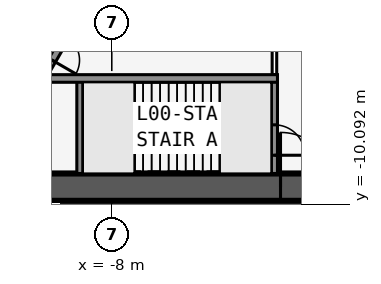
"""IFC4 building model, lengths in metres.
Left out: names, types, materials, properties, quantities, classifications, styles, units other than length and angle.
Written with IfcOpenShell. Run it as: python <this file> out.ifc"""

import sys

from ifc_helpers import new_model, si_unit, direction, frame, frame_2d, origin, place, context, subcontext, project, spatial, rectangle, extrude, element, fill, save


model = new_model("IFC4")
c1 = context("Model", 3, precision=1e-05, world=origin(), true_north=direction((0.0, 1.0)))
c2 = subcontext(c1, "Body", "Model", "MODEL_VIEW")
j1 = project(units=[si_unit("LENGTHUNIT", "METRE"), si_unit("PLANEANGLEUNIT", "RADIAN")], contexts=[c1])
p1 = place(None, origin())
s1 = spatial("IfcSite", under=j1, at=p1, CompositionType="ELEMENT")
p2 = place(p1, origin())
s2 = spatial("IfcBuilding", under=s1, at=p2, CompositionType="ELEMENT")
p3 = place(p2, origin())
s3 = spatial("IfcBuildingStorey", under=s2, at=p3, CompositionType="ELEMENT", Elevation=0.0)
p4 = place(p3, frame((-16.5, -9.526, -0.3), z_axis=(0.0, 0.0, 1.0), x_axis=(1.0, 0.0, 0.0)))
e1 = element("IfcWall", 1, at=p4, inside=s3, PredefinedType="SHEAR", context=c2, shape_type="SweptSolid", body=[
    extrude(rectangle(XDim=33.0, YDim=0.9, at=frame_2d((16.5, 0.0))), origin(), (0.0, 0.0, 1.0), 6.3),
])
p5 = place(p4, frame((14.05, 0.0, 0.3)))
e2 = element("IfcOpeningElement", 2, at=p5, cuts=e1, PredefinedType="OPENING", context=c2, shape_type="SweptSolid", body=[
    extrude(rectangle(XDim=1.8, YDim=2.13, at=frame_2d((0.9, 1.065))), frame((0.0, 0.46, 0.0), z_axis=(0.0, -1.0, 0.0), x_axis=(1.0, 0.0, 0.0)), (0.0, 0.0, 1.0), 0.92),
])
p6 = place(p3, frame((-10.183, -5.951, -0.3), z_axis=(0.0, 0.0, 1.0), x_axis=(1.0, 0.0, 0.0)))
e3 = element("IfcWall", 3, at=p6, inside=s3, PredefinedType="SOLIDWALL", context=c2, shape_type="SweptSolid", body=[
    extrude(rectangle(XDim=7.633, YDim=0.25, at=frame_2d((3.816, 0.0))), origin(), (0.0, 0.0, 1.0), 6.05),
])
p7 = place(p3, frame((-9.05, -5.951, -0.3), z_axis=(0.0, 0.0, 1.0), x_axis=(0.0, -1.0, 0.0)))
e4 = element("IfcWall", 4, at=p7, inside=s3, PredefinedType="SOLIDWALL", context=c2, shape_type="SweptSolid", body=[
    extrude(rectangle(XDim=3.125, YDim=0.2, at=frame_2d((1.562, 0.0))), origin(), (0.0, 0.0, 1.0), 6.05),
])
p8 = place(p3, frame((-2.65, -5.951, -0.3), z_axis=(0.0, 0.0, 1.0), x_axis=(0.0, -1.0, 0.0)))
e5 = element("IfcWall", 5, at=p8, inside=s3, PredefinedType="SOLIDWALL", context=c2, shape_type="SweptSolid", body=[
    extrude(rectangle(XDim=3.125, YDim=0.2, at=frame_2d((1.562, 0.0))), origin(), (0.0, 0.0, 1.0), 6.05),
])
p9 = place(p8, frame((1.525, 0.0, 0.3)))
e6 = element("IfcOpeningElement", 6, at=p9, cuts=e5, PredefinedType="OPENING", context=c2, shape_type="SweptSolid", body=[
    extrude(rectangle(XDim=1.0, YDim=2.13, at=frame_2d((0.5, 1.065))), frame((0.0, 0.11, 0.0), z_axis=(0.0, -1.0, 0.0), x_axis=(1.0, 0.0, 0.0)), (0.0, 0.0, 1.0), 0.22),
])
p10 = place(p3, frame((0.0, 19.052, -0.3), z_axis=(0.0, 0.0, 1.0), x_axis=(-0.499999749417, -0.866025548458, 0.0)))
e7 = element("IfcWall", 7, at=p10, inside=s3, PredefinedType="SHEAR", context=c2, shape_type="SweptSolid", body=[
    extrude(rectangle(XDim=33.0, YDim=0.9, at=frame_2d((16.5, 0.0))), origin(), (0.0, 0.0, 1.0), 6.3),
])
p11 = place(p10, frame((14.15, 0.0, 0.3)))
e8 = element("IfcOpeningElement", 8, at=p11, cuts=e7, PredefinedType="OPENING", context=c2, shape_type="SweptSolid", body=[
    extrude(rectangle(XDim=1.8, YDim=2.13, at=frame_2d((0.9, 1.065))), frame((0.0, 0.46, 0.0), z_axis=(0.0, -1.0, 0.0), x_axis=(1.0, 0.0, 0.0)), (0.0, 0.0, 1.0), 0.92),
])
p12 = place(p10, frame((12.6, 0.0, 0.3)))
e9 = element("IfcOpeningElement", 9, at=p12, cuts=e7, PredefinedType="OPENING", context=c2, shape_type="SweptSolid", body=[
    extrude(rectangle(XDim=1.0, YDim=2.13, at=frame_2d((0.5, 1.065))), frame((0.0, 0.46, 0.0), z_axis=(0.0, -1.0, 0.0), x_axis=(1.0, 0.0, 0.0)), (0.0, 0.0, 1.0), 0.92),
])
p13 = place(p3, frame((-4.929, 3.365, -0.3), z_axis=(0.0, 0.0, 1.0), x_axis=(-0.499991433582, -0.866030349552, 0.0)))
e10 = element("IfcWall", 10, at=p13, inside=s3, PredefinedType="SOLIDWALL", context=c2, shape_type="SweptSolid", body=[
    extrude(rectangle(XDim=10.633, YDim=0.25, at=frame_2d((5.316, 0.0))), origin(), (0.0, 0.0, 1.0), 6.05),
])
p14 = place(p13, frame((9.164, 0.0, 0.3)))
e11 = element("IfcOpeningElement", 11, at=p14, cuts=e10, PredefinedType="OPENING", context=c2, shape_type="SweptSolid", body=[
    extrude(rectangle(XDim=0.9, YDim=2.13, at=frame_2d((0.45, 1.065))), frame((0.0, 0.135, 0.0), z_axis=(0.0, -1.0, 0.0), x_axis=(1.0, 0.0, 0.0)), (0.0, 0.0, 1.0), 0.27),
])
p15 = place(p13, frame((6.8, 0.0, 0.3)))
e12 = element("IfcOpeningElement", 12, at=p15, cuts=e10, PredefinedType="OPENING", context=c2, shape_type="SweptSolid", body=[
    extrude(rectangle(XDim=1.1, YDim=2.13, at=frame_2d((0.55, 1.065))), frame((0.0, 0.135, 0.0), z_axis=(0.0, -1.0, 0.0), x_axis=(1.0, 0.0, 0.0)), (0.0, 0.0, 1.0), 0.27),
])
p16 = place(p13, frame((1.0, 0.0, 0.3)))
e13 = element("IfcOpeningElement", 13, at=p16, cuts=e10, PredefinedType="OPENING", context=c2, shape_type="SweptSolid", body=[
    extrude(rectangle(XDim=1.1, YDim=2.13, at=frame_2d((0.55, 1.065))), frame((0.0, 0.135, 0.0), z_axis=(0.0, -1.0, 0.0), x_axis=(1.0, 0.0, 0.0)), (0.0, 0.0, 1.0), 0.27),
])
p17 = place(p13, frame((3.9, 0.0, 0.3)))
e14 = element("IfcOpeningElement", 14, at=p17, cuts=e10, PredefinedType="OPENING", context=c2, shape_type="SweptSolid", body=[
    extrude(rectangle(XDim=1.1, YDim=2.13, at=frame_2d((0.55, 1.065))), frame((0.0, 0.135, 0.0), z_axis=(0.0, -1.0, 0.0), x_axis=(1.0, 0.0, 0.0)), (0.0, 0.0, 1.0), 0.27),
])
p18 = place(p3, frame((-0.5, 22.836, -0.3), z_axis=(0.0, 0.0, 1.0), x_axis=(-0.500001677587, -0.866024435227, 0.0)))
e15 = element("IfcWall", 15, at=p18, inside=s3, PredefinedType="PARTITIONING", context=c2, shape_type="SweptSolid", body=[
    extrude(rectangle(XDim=39.054, YDim=0.15, at=frame_2d((19.527, 0.0))), origin(), (0.0, 0.0, 1.0), 5.108),
])
p19 = place(p18, frame((2.013, 0.0, 0.3)))
e16 = element("IfcOpeningElement", 16, at=p19, cuts=e15, PredefinedType="OPENING", context=c2, shape_type="SweptSolid", body=[
    extrude(rectangle(XDim=1.8, YDim=2.13, at=frame_2d((0.9, 1.065))), frame((0.0, 0.085, 0.0), z_axis=(0.0, -1.0, 0.0), x_axis=(1.0, 0.0, 0.0)), (0.0, 0.0, 1.0), 0.17),
])
p20 = place(p18, frame((10.427, 0.0, 0.3)))
e17 = element("IfcOpeningElement", 17, at=p20, cuts=e15, PredefinedType="OPENING", context=c2, shape_type="SweptSolid", body=[
    extrude(rectangle(XDim=1.8, YDim=2.13, at=frame_2d((0.9, 1.065))), frame((0.0, 0.085, 0.0), z_axis=(0.0, -1.0, 0.0), x_axis=(1.0, 0.0, 0.0)), (0.0, 0.0, 1.0), 0.17),
])
p21 = place(p18, frame((18.427, 0.0, 0.3)))
e18 = element("IfcOpeningElement", 18, at=p21, cuts=e15, PredefinedType="OPENING", context=c2, shape_type="SweptSolid", body=[
    extrude(rectangle(XDim=1.8, YDim=2.13, at=frame_2d((0.9, 1.065))), frame((0.0, 0.085, 0.0), z_axis=(0.0, -1.0, 0.0), x_axis=(1.0, 0.0, 0.0)), (0.0, 0.0, 1.0), 0.17),
])
p22 = place(p18, frame((23.227, 0.0, 0.3)))
e19 = element("IfcOpeningElement", 19, at=p22, cuts=e15, PredefinedType="OPENING", context=c2, shape_type="SweptSolid", body=[
    extrude(rectangle(XDim=1.8, YDim=2.13, at=frame_2d((0.9, 1.065))), frame((0.0, 0.085, 0.0), z_axis=(0.0, -1.0, 0.0), x_axis=(1.0, 0.0, 0.0)), (0.0, 0.0, 1.0), 0.17),
])
p23 = place(p18, frame((27.627, 0.0, 0.3)))
e20 = element("IfcOpeningElement", 20, at=p23, cuts=e15, PredefinedType="OPENING", context=c2, shape_type="SweptSolid", body=[
    extrude(rectangle(XDim=1.0, YDim=2.13, at=frame_2d((0.5, 1.065))), frame((0.0, 0.085, 0.0), z_axis=(0.0, -1.0, 0.0), x_axis=(1.0, 0.0, 0.0)), (0.0, 0.0, 1.0), 0.17),
])
p24 = place(p18, frame((30.277, 0.0, 0.3)))
e21 = element("IfcOpeningElement", 21, at=p24, cuts=e15, PredefinedType="OPENING", context=c2, shape_type="SweptSolid", body=[
    extrude(rectangle(XDim=1.0, YDim=2.13, at=frame_2d((0.5, 1.065))), frame((0.0, 0.085, 0.0), z_axis=(0.0, -1.0, 0.0), x_axis=(1.0, 0.0, 0.0)), (0.0, 0.0, 1.0), 0.17),
])
p25 = place(p18, frame((34.89, 0.0, 0.3)))
e22 = element("IfcOpeningElement", 22, at=p25, cuts=e15, PredefinedType="OPENING", context=c2, shape_type="SweptSolid", body=[
    extrude(rectangle(XDim=1.0, YDim=2.13, at=frame_2d((0.5, 1.065))), frame((0.0, 0.085, 0.0), z_axis=(0.0, -1.0, 0.0), x_axis=(1.0, 0.0, 0.0)), (0.0, 0.0, 1.0), 0.17),
])
p26 = place(p3, frame((-2.65, -5.826, -0.3), z_axis=(0.0, 0.0, 1.0), x_axis=(0.0, 1.0, 0.0)))
e23 = element("IfcWall", 23, at=p26, inside=s3, PredefinedType="PARTITIONING", context=c2, shape_type="SweptSolid", body=[
    extrude(rectangle(XDim=2.5, YDim=0.15, at=frame_2d((1.25, 0.0))), origin(), (0.0, 0.0, 1.0), 6.05),
])
p27 = place(p3, frame((-7.247, -7.576, 0.0), z_axis=(0.0, 0.0, 1.0), x_axis=(1.0, 0.0, 0.0)))
e24 = element("IfcWall", 24, at=p27, inside=s3, PredefinedType="SOLIDWALL", context=c2, shape_type="SweptSolid", body=[
    extrude(rectangle(XDim=2.794, YDim=0.1, at=frame_2d((1.397, 0.0))), origin(), (0.0, 0.0, 1.0), 6.0),
])
p28 = place(p5, origin())
e25 = element("IfcDoor", 25, at=p28, inside=s3, OperationType="DOUBLE_DOOR_SINGLE_SWING", PredefinedType="DOOR", context=c2, shape_type="SweptSolid", body=[
    extrude(rectangle(XDim=1.8, YDim=2.13, at=frame_2d((0.9, 1.065))), frame((0.0, 0.025, 0.0), z_axis=(0.0, -1.0, 0.0), x_axis=(1.0, 0.0, 0.0)), (0.0, 0.0, 1.0), 0.05),
])
fill(e2, e25)
p29 = place(p9, origin())
e26 = element("IfcDoor", 26, at=p29, inside=s3, OperationType="SINGLE_SWING_RIGHT", PredefinedType="DOOR", context=c2, shape_type="SweptSolid", body=[
    extrude(rectangle(XDim=1.0, YDim=2.13, at=frame_2d((0.5, 1.065))), frame((0.0, 0.025, 0.0), z_axis=(0.0, -1.0, 0.0), x_axis=(1.0, 0.0, 0.0)), (0.0, 0.0, 1.0), 0.05),
])
fill(e6, e26)
p30 = place(p14, origin())
e27 = element("IfcDoor", 27, at=p30, inside=s3, OperationType="SINGLE_SWING_RIGHT", PredefinedType="DOOR", context=c2, shape_type="SweptSolid", body=[
    extrude(rectangle(XDim=0.9, YDim=2.13, at=frame_2d((0.45, 1.065))), frame((0.0, 0.025, 0.0), z_axis=(0.0, -1.0, 0.0), x_axis=(1.0, 0.0, 0.0)), (0.0, 0.0, 1.0), 0.05),
])
fill(e11, e27)
save(model, sys.argv[1])
